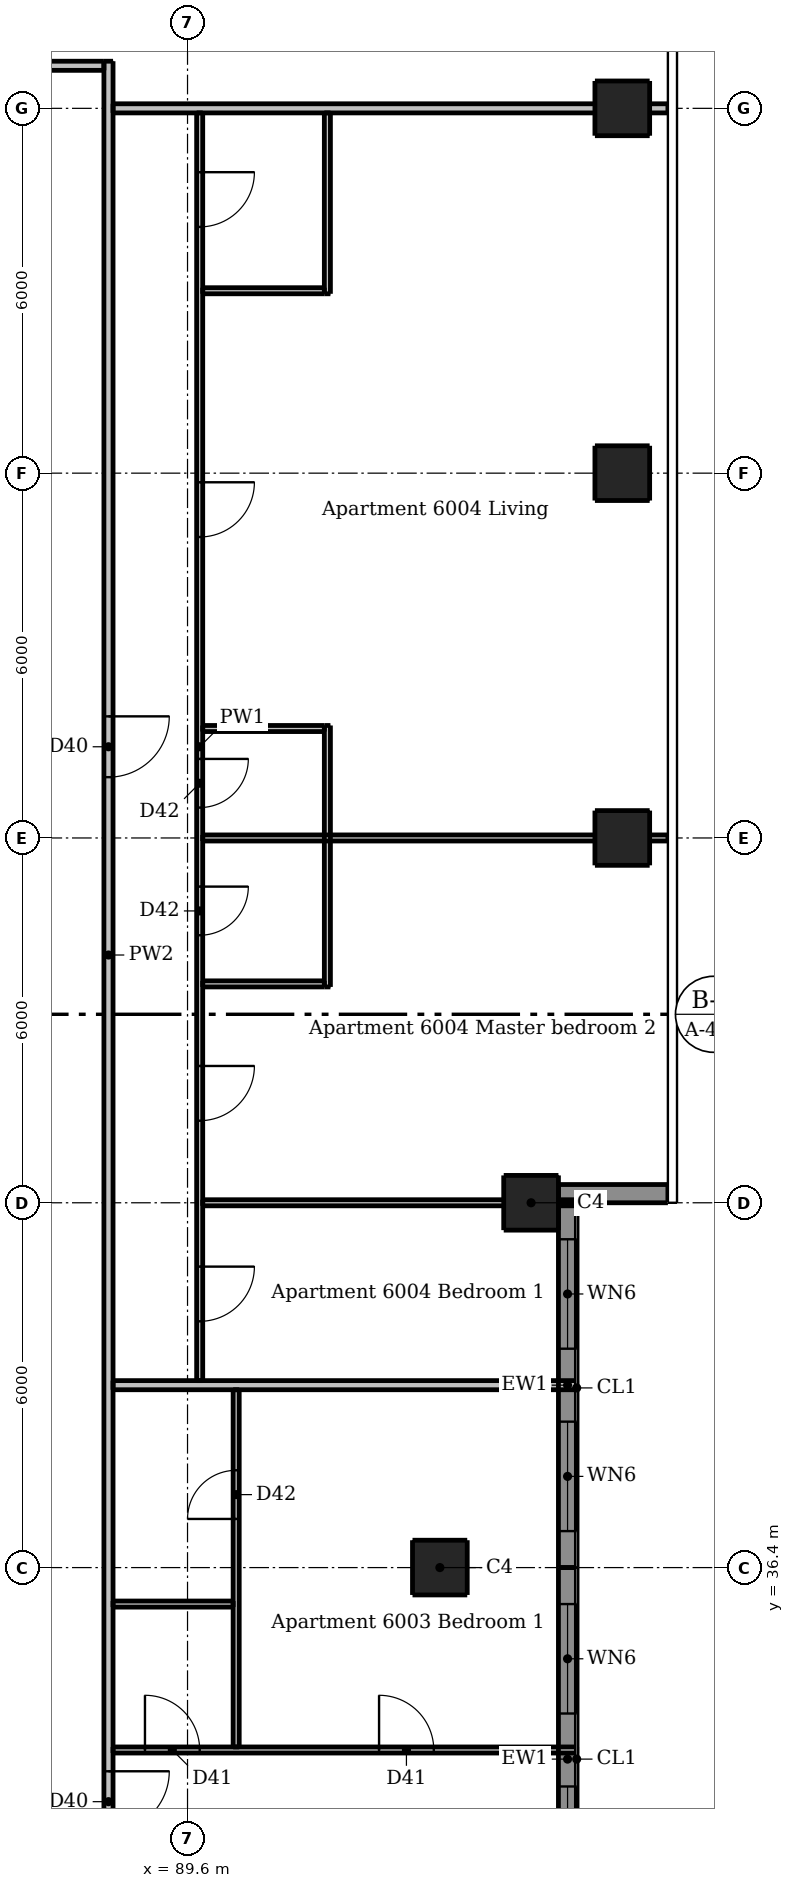
"""IFC4 building model, lengths in metres.
Left out: names, types, materials, properties, quantities, classifications, styles, units other than length and angle.
Written with IfcOpenShell. Run it as: python <this file> out.ifc"""

import sys

from ifc_helpers import new_model, si_unit, direction, frame, frame_2d, origin, origin_2d, place, context, subcontext, project, spatial, rectangle, extrude, element, fill, save


model = new_model("IFC4")
c1 = context("Model", 3, precision=1e-05, world=origin(), true_north=direction((0.0, 1.0)))
c2 = subcontext(c1, "Body", "Model", "MODEL_VIEW")
j1 = project(units=[si_unit("LENGTHUNIT", "METRE"), si_unit("PLANEANGLEUNIT", "RADIAN")], contexts=[c1])
p1 = place(None, origin())
s1 = spatial("IfcSite", under=j1, at=p1, CompositionType="ELEMENT")
p2 = place(p1, origin())
s2 = spatial("IfcBuilding", under=s1, at=p2, CompositionType="ELEMENT")
p3 = place(p2, frame((0.0, 0.0, 223.3)))
s3 = spatial("IfcBuildingStorey", under=s2, at=p3, CompositionType="ELEMENT", Elevation=223.3)
for number, where, z_axis, x_axis in (
    (1, (93.75, 36.4, 0.0), (0.0, 0.0, 1.0), (1.0, 0.0, 0.0)),
    (2, (95.25, 42.4, 0.0), (0.0, 0.0, 1.0), (1.0, 0.0, 0.0)),
    (3, (96.75, 48.4, 0.0), (0.0, 0.0, 1.0), (1.0, 0.0, 0.0)),
    (4, (96.75, 54.4, 0.0), (0.0, 0.0, 1.0), (1.0, 0.0, 0.0)),
    (5, (96.75, 60.4, 0.0), (0.0, 0.0, 1.0), (1.0, 0.0, 0.0)),
):
    element("IfcColumn", number, at=place(p3, frame(where, z_axis=z_axis, x_axis=x_axis)), inside=s3, PredefinedType="COLUMN", context=c2, shape_type="SweptSolid", body=[
        extrude(rectangle(XDim=0.9, YDim=0.9, at=origin_2d()), origin(), (0.0, 0.0, 1.0), 3.05),
    ])
p4 = place(p3, frame((95.7, 42.55, 0.0), z_axis=(0.0, 0.0, 1.0), x_axis=(1.0, 0.0, 0.0)))
e6 = element("IfcWall", 6, at=p4, inside=s3, PredefinedType="SOLIDWALL", context=c2, shape_type="SweptSolid", body=[
    extrude(rectangle(XDim=1.8, YDim=0.3, at=frame_2d((0.9, 0.0))), origin(), (0.0, 0.0, 1.0), 3.05),
])
p5 = place(p3, frame((95.85, 30.1, 0.0), z_axis=(0.0, 0.0, 1.0), x_axis=(0.0, 1.0, 0.0)))
e7 = element("IfcWall", 7, at=p5, inside=s3, PredefinedType="SOLIDWALL", context=c2, shape_type="SweptSolid", body=[
    extrude(rectangle(XDim=6.3, YDim=0.3, at=frame_2d((3.15, 0.0))), origin(), (0.0, 0.0, 1.0), 3.05),
])
p6 = place(p5, frame((0.9, 0.0, 0.15)))
e8 = element("IfcOpeningElement", 8, at=p6, cuts=e7, PredefinedType="OPENING", context=c2, shape_type="SweptSolid", body=[
    extrude(rectangle(XDim=1.8, YDim=2.1, at=frame_2d((0.9, 1.05))), frame((0.0, 0.16, 0.0), z_axis=(0.0, -1.0, 0.0), x_axis=(1.0, 0.0, 0.0)), (0.0, 0.0, 1.0), 0.32),
])
p7 = place(p5, frame((3.9, 0.0, 0.15)))
e9 = element("IfcOpeningElement", 9, at=p7, cuts=e7, PredefinedType="OPENING", context=c2, shape_type="SweptSolid", body=[
    extrude(rectangle(XDim=1.8, YDim=2.1, at=frame_2d((0.9, 1.05))), frame((0.0, 0.16, 0.0), z_axis=(0.0, -1.0, 0.0), x_axis=(1.0, 0.0, 0.0)), (0.0, 0.0, 1.0), 0.32),
])
p8 = place(p3, frame((95.85, 36.4, 0.0), z_axis=(0.0, 0.0, 1.0), x_axis=(0.0, 1.0, 0.0)))
e10 = element("IfcWall", 10, at=p8, inside=s3, PredefinedType="SOLIDWALL", context=c2, shape_type="SweptSolid", body=[
    extrude(rectangle(XDim=6.0, YDim=0.3, at=frame_2d((3.0, 0.0))), origin(), (0.0, 0.0, 1.0), 3.05),
])
p9 = place(p8, frame((0.6, 0.0, 0.15)))
e11 = element("IfcOpeningElement", 11, at=p9, cuts=e10, PredefinedType="OPENING", context=c2, shape_type="SweptSolid", body=[
    extrude(rectangle(XDim=1.8, YDim=2.1, at=frame_2d((0.9, 1.05))), frame((0.0, 0.16, 0.0), z_axis=(0.0, -1.0, 0.0), x_axis=(1.0, 0.0, 0.0)), (0.0, 0.0, 1.0), 0.32),
])
p10 = place(p8, frame((3.6, 0.0, 0.15)))
e12 = element("IfcOpeningElement", 12, at=p10, cuts=e10, PredefinedType="OPENING", context=c2, shape_type="SweptSolid", body=[
    extrude(rectangle(XDim=1.8, YDim=2.1, at=frame_2d((0.9, 1.05))), frame((0.0, 0.16, 0.0), z_axis=(0.0, -1.0, 0.0), x_axis=(1.0, 0.0, 0.0)), (0.0, 0.0, 1.0), 0.32),
])
p11 = place(p3, frame((89.8, 60.325, 0.0), z_axis=(0.0, 0.0, 1.0), x_axis=(0.0, -1.0, 0.0)))
e13 = element("IfcWall", 13, at=p11, inside=s3, PredefinedType="PARTITIONING", context=c2, shape_type="SweptSolid", body=[
    extrude(rectangle(XDim=20.85, YDim=0.1, at=frame_2d((10.425, 0.0))), origin(), (0.0, 0.0, 1.0), 3.05),
])
p12 = place(p11, frame((6.075, 0.0, 0.0)))
e14 = element("IfcOpeningElement", 14, at=p12, cuts=e13, PredefinedType="OPENING", context=c2, shape_type="SweptSolid", body=[
    extrude(rectangle(XDim=0.9, YDim=2.1, at=frame_2d((0.45, 1.05))), frame((0.0, 0.06, 0.0), z_axis=(0.0, -1.0, 0.0), x_axis=(1.0, 0.0, 0.0)), (0.0, 0.0, 1.0), 0.12),
])
p13 = place(p11, frame((0.975, 0.0, 0.0)))
e15 = element("IfcOpeningElement", 15, at=p13, cuts=e13, PredefinedType="OPENING", context=c2, shape_type="SweptSolid", body=[
    extrude(rectangle(XDim=0.9, YDim=2.1, at=frame_2d((0.45, 1.05))), frame((0.0, 0.06, 0.0), z_axis=(0.0, -1.0, 0.0), x_axis=(1.0, 0.0, 0.0)), (0.0, 0.0, 1.0), 0.12),
])
p14 = place(p11, frame((10.625, 0.0, 0.0)))
e16 = element("IfcOpeningElement", 16, at=p14, cuts=e13, PredefinedType="OPENING", context=c2, shape_type="SweptSolid", body=[
    extrude(rectangle(XDim=0.8, YDim=2.1, at=frame_2d((0.4, 1.05))), frame((0.0, 0.06, 0.0), z_axis=(0.0, -1.0, 0.0), x_axis=(1.0, 0.0, 0.0)), (0.0, 0.0, 1.0), 0.12),
])
p15 = place(p11, frame((18.975, 0.0, 0.0)))
e17 = element("IfcOpeningElement", 17, at=p15, cuts=e13, PredefinedType="OPENING", context=c2, shape_type="SweptSolid", body=[
    extrude(rectangle(XDim=0.9, YDim=2.1, at=frame_2d((0.45, 1.05))), frame((0.0, 0.06, 0.0), z_axis=(0.0, -1.0, 0.0), x_axis=(1.0, 0.0, 0.0)), (0.0, 0.0, 1.0), 0.12),
])
p16 = place(p11, frame((15.675, 0.0, 0.0)))
e18 = element("IfcOpeningElement", 18, at=p16, cuts=e13, PredefinedType="OPENING", context=c2, shape_type="SweptSolid", body=[
    extrude(rectangle(XDim=0.9, YDim=2.1, at=frame_2d((0.45, 1.05))), frame((0.0, 0.06, 0.0), z_axis=(0.0, -1.0, 0.0), x_axis=(1.0, 0.0, 0.0)), (0.0, 0.0, 1.0), 0.12),
])
p17 = place(p11, frame((12.725, 0.0, 0.0)))
e19 = element("IfcOpeningElement", 19, at=p17, cuts=e13, PredefinedType="OPENING", context=c2, shape_type="SweptSolid", body=[
    extrude(rectangle(XDim=0.8, YDim=2.1, at=frame_2d((0.4, 1.05))), frame((0.0, 0.06, 0.0), z_axis=(0.0, -1.0, 0.0), x_axis=(1.0, 0.0, 0.0)), (0.0, 0.0, 1.0), 0.12),
])
p18 = place(p3, frame((90.4, 33.45, 0.0), z_axis=(0.0, 0.0, 1.0), x_axis=(0.0, 1.0, 0.0)))
e20 = element("IfcWall", 20, at=p18, inside=s3, PredefinedType="PARTITIONING", context=c2, shape_type="SweptSolid", body=[
    extrude(rectangle(XDim=5.875, YDim=0.1, at=frame_2d((2.938, 0.0))), origin(), (0.0, 0.0, 1.0), 3.05),
])
p19 = place(p18, frame((3.75, 0.0, 0.0)))
e21 = element("IfcOpeningElement", 21, at=p19, cuts=e20, PredefinedType="OPENING", context=c2, shape_type="SweptSolid", body=[
    extrude(rectangle(XDim=0.8, YDim=2.1, at=frame_2d((0.4, 1.05))), frame((0.0, 0.06, 0.0), z_axis=(0.0, -1.0, 0.0), x_axis=(1.0, 0.0, 0.0)), (0.0, 0.0, 1.0), 0.12),
])
p20 = place(p3, frame((91.9, 45.95, 0.0), z_axis=(0.0, 0.0, 1.0), x_axis=(0.0, 1.0, 0.0)))
e22 = element("IfcWall", 22, at=p20, inside=s3, PredefinedType="PARTITIONING", context=c2, shape_type="SweptSolid", body=[
    extrude(rectangle(XDim=4.3, YDim=0.1, at=frame_2d((2.15, 0.0))), origin(), (0.0, 0.0, 1.0), 3.05),
])
p21 = place(p3, frame((91.9, 57.35, 0.0), z_axis=(0.0, 0.0, 1.0), x_axis=(0.0, 1.0, 0.0)))
e23 = element("IfcWall", 23, at=p21, inside=s3, PredefinedType="PARTITIONING", context=c2, shape_type="SweptSolid", body=[
    extrude(rectangle(XDim=2.975, YDim=0.1, at=frame_2d((1.487, 0.0))), origin(), (0.0, 0.0, 1.0), 3.05),
])
for number, where, z_axis, x_axis in (
    (24, (89.85, 57.4, 0.0), (0.0, 0.0, 1.0), (1.0, 0.0, 0.0)),
    (25, (89.85, 50.2, 0.0), (0.0, 0.0, 1.0), (1.0, 0.0, 0.0)),
):
    element("IfcWall", number, at=place(p3, frame(where, z_axis=z_axis, x_axis=x_axis)), inside=s3, PredefinedType="PARTITIONING", context=c2, shape_type="SweptSolid", body=[
        extrude(rectangle(XDim=2.0, YDim=0.1, at=frame_2d((1.0, 0.0))), origin(), (0.0, 0.0, 1.0), 3.05),
    ])
p22 = place(p3, frame((89.85, 48.4, 0.0), z_axis=(0.0, 0.0, 1.0), x_axis=(1.0, 0.0, 0.0)))
e26 = element("IfcWall", 26, at=p22, inside=s3, PredefinedType="PARTITIONING", context=c2, shape_type="SweptSolid", body=[
    extrude(rectangle(XDim=7.65, YDim=0.1, at=frame_2d((3.825, 0.0))), origin(), (0.0, 0.0, 1.0), 2.516),
])
p23 = place(p3, frame((89.85, 46.0, 0.0), z_axis=(0.0, 0.0, 1.0), x_axis=(1.0, 0.0, 0.0)))
e27 = element("IfcWall", 27, at=p23, inside=s3, PredefinedType="PARTITIONING", context=c2, shape_type="SweptSolid", body=[
    extrude(rectangle(XDim=2.0, YDim=0.1, at=frame_2d((1.0, 0.0))), origin(), (0.0, 0.0, 1.0), 3.05),
])
p24 = place(p3, frame((89.85, 42.4, 0.0), z_axis=(0.0, 0.0, 1.0), x_axis=(1.0, 0.0, 0.0)))
e28 = element("IfcWall", 28, at=p24, inside=s3, PredefinedType="PARTITIONING", context=c2, shape_type="SweptSolid", body=[
    extrude(rectangle(XDim=6.15, YDim=0.1, at=frame_2d((3.075, 0.0))), origin(), (0.0, 0.0, 1.0), 2.59),
])
p25 = place(p3, frame((88.375, 35.8, 0.0), z_axis=(0.0, 0.0, 1.0), x_axis=(1.0, 0.0, 0.0)))
e29 = element("IfcWall", 29, at=p25, inside=s3, PredefinedType="PARTITIONING", context=c2, shape_type="SweptSolid", body=[
    extrude(rectangle(XDim=1.975, YDim=0.1, at=frame_2d((0.988, 0.0))), origin(), (0.0, 0.0, 1.0), 3.05),
])
p26 = place(p3, frame((88.375, 33.4, 0.0), z_axis=(0.0, 0.0, 1.0), x_axis=(1.0, 0.0, 0.0)))
e30 = element("IfcWall", 30, at=p26, inside=s3, PredefinedType="PARTITIONING", context=c2, shape_type="SweptSolid", body=[
    extrude(rectangle(XDim=7.625, YDim=0.1, at=frame_2d((3.812, 0.0))), origin(), (0.0, 0.0, 1.0), 3.05),
])
p27 = place(p26, frame((0.525, 0.0, 0.0)))
e31 = element("IfcOpeningElement", 31, at=p27, cuts=e30, PredefinedType="OPENING", context=c2, shape_type="SweptSolid", body=[
    extrude(rectangle(XDim=0.9, YDim=2.1, at=frame_2d((0.45, 1.05))), frame((0.0, 0.06, 0.0), z_axis=(0.0, -1.0, 0.0), x_axis=(1.0, 0.0, 0.0)), (0.0, 0.0, 1.0), 0.12),
])
p28 = place(p26, frame((4.375, 0.0, 0.0)))
e32 = element("IfcOpeningElement", 32, at=p28, cuts=e30, PredefinedType="OPENING", context=c2, shape_type="SweptSolid", body=[
    extrude(rectangle(XDim=0.9, YDim=2.1, at=frame_2d((0.45, 1.05))), frame((0.0, 0.06, 0.0), z_axis=(0.0, -1.0, 0.0), x_axis=(1.0, 0.0, 0.0)), (0.0, 0.0, 1.0), 0.12),
])
p29 = place(p3, frame((88.3, 61.175, 0.0), z_axis=(0.0, 0.0, 1.0), x_axis=(0.0, -1.0, 0.0)))
e33 = element("IfcWall", 33, at=p29, inside=s3, PredefinedType="PARTITIONING", context=c2, shape_type="SweptSolid", body=[
    extrude(rectangle(XDim=29.4, YDim=0.15, at=frame_2d((14.7, 0.0))), origin(), (0.0, 0.0, 1.0), 3.05),
])
p30 = place(p29, frame((28.125, 0.0, 0.0)))
e34 = element("IfcOpeningElement", 34, at=p30, cuts=e33, PredefinedType="OPENING", context=c2, shape_type="SweptSolid", body=[
    extrude(rectangle(XDim=1.0, YDim=2.1, at=frame_2d((0.5, 1.05))), frame((0.0, 0.085, 0.0), z_axis=(0.0, -1.0, 0.0), x_axis=(1.0, 0.0, 0.0)), (0.0, 0.0, 1.0), 0.17),
])
p31 = place(p29, frame((10.775, 0.0, 0.0)))
e35 = element("IfcOpeningElement", 35, at=p31, cuts=e33, PredefinedType="OPENING", context=c2, shape_type="SweptSolid", body=[
    extrude(rectangle(XDim=1.0, YDim=2.1, at=frame_2d((0.5, 1.05))), frame((0.0, 0.085, 0.0), z_axis=(0.0, -1.0, 0.0), x_axis=(1.0, 0.0, 0.0)), (0.0, 0.0, 1.0), 0.17),
])
p32 = place(p3, frame((58.975, 61.1, 0.0), z_axis=(0.0, 0.0, 1.0), x_axis=(1.0, 0.0, 0.0)))
e36 = element("IfcWall", 36, at=p32, inside=s3, PredefinedType="PARTITIONING", context=c2, shape_type="SweptSolid", body=[
    extrude(rectangle(XDim=29.25, YDim=0.15, at=frame_2d((14.625, 0.0))), origin(), (0.0, 0.0, 1.0), 3.05),
])
p33 = place(p32, frame((9.125, 0.0, 0.0)))
e37 = element("IfcOpeningElement", 37, at=p33, cuts=e36, PredefinedType="OPENING", context=c2, shape_type="SweptSolid", body=[
    extrude(rectangle(XDim=1.0, YDim=2.1, at=frame_2d((0.5, 1.05))), frame((0.0, 0.085, 0.0), z_axis=(0.0, -1.0, 0.0), x_axis=(1.0, 0.0, 0.0)), (0.0, 0.0, 1.0), 0.17),
])
p34 = place(p32, frame((26.475, 0.0, 0.0)))
e38 = element("IfcOpeningElement", 38, at=p34, cuts=e36, PredefinedType="OPENING", context=c2, shape_type="SweptSolid", body=[
    extrude(rectangle(XDim=1.0, YDim=2.1, at=frame_2d((0.5, 1.05))), frame((0.0, 0.085, 0.0), z_axis=(0.0, -1.0, 0.0), x_axis=(1.0, 0.0, 0.0)), (0.0, 0.0, 1.0), 0.17),
])
p35 = place(p3, frame((88.375, 60.4, 0.0), z_axis=(0.0, 0.0, 1.0), x_axis=(1.0, 0.0, 0.0)))
e39 = element("IfcWall", 39, at=p35, inside=s3, PredefinedType="PARTITIONING", context=c2, shape_type="SweptSolid", body=[
    extrude(rectangle(XDim=9.125, YDim=0.15, at=frame_2d((4.562, 0.0))), origin(), (0.0, 0.0, 1.0), 2.59),
])
p36 = place(p3, frame((88.375, 39.4, 0.0), z_axis=(0.0, 0.0, 1.0), x_axis=(1.0, 0.0, 0.0)))
e40 = element("IfcWall", 40, at=p36, inside=s3, PredefinedType="PARTITIONING", context=c2, shape_type="SweptSolid", body=[
    extrude(rectangle(XDim=7.625, YDim=0.15, at=frame_2d((3.812, 0.0))), origin(), (0.0, 0.0, 1.0), 3.05),
])
p37 = place(p6, origin())
e41 = element("IfcWindow", 41, at=p37, inside=s3, PartitioningType="DOUBLE_PANEL_VERTICAL", PredefinedType="WINDOW", context=c2, shape_type="SweptSolid", body=[
    extrude(rectangle(XDim=1.8, YDim=2.1, at=frame_2d((0.9, 1.05))), frame((0.0, 0.03, 0.0), z_axis=(0.0, -1.0, 0.0), x_axis=(1.0, 0.0, 0.0)), (0.0, 0.0, 1.0), 0.06),
])
fill(e8, e41)
p38 = place(p7, origin())
e42 = element("IfcWindow", 42, at=p38, inside=s3, PartitioningType="DOUBLE_PANEL_VERTICAL", PredefinedType="WINDOW", context=c2, shape_type="SweptSolid", body=[
    extrude(rectangle(XDim=1.8, YDim=2.1, at=frame_2d((0.9, 1.05))), frame((0.0, 0.03, 0.0), z_axis=(0.0, -1.0, 0.0), x_axis=(1.0, 0.0, 0.0)), (0.0, 0.0, 1.0), 0.06),
])
fill(e9, e42)
p39 = place(p9, origin())
e43 = element("IfcWindow", 43, at=p39, inside=s3, PartitioningType="DOUBLE_PANEL_VERTICAL", PredefinedType="WINDOW", context=c2, shape_type="SweptSolid", body=[
    extrude(rectangle(XDim=1.8, YDim=2.1, at=frame_2d((0.9, 1.05))), frame((0.0, 0.03, 0.0), z_axis=(0.0, -1.0, 0.0), x_axis=(1.0, 0.0, 0.0)), (0.0, 0.0, 1.0), 0.06),
])
fill(e11, e43)
p40 = place(p10, origin())
e44 = element("IfcWindow", 44, at=p40, inside=s3, PartitioningType="DOUBLE_PANEL_VERTICAL", PredefinedType="WINDOW", context=c2, shape_type="SweptSolid", body=[
    extrude(rectangle(XDim=1.8, YDim=2.1, at=frame_2d((0.9, 1.05))), frame((0.0, 0.03, 0.0), z_axis=(0.0, -1.0, 0.0), x_axis=(1.0, 0.0, 0.0)), (0.0, 0.0, 1.0), 0.06),
])
fill(e12, e44)
p41 = place(p30, origin())
e45 = element("IfcDoor", 45, at=p41, inside=s3, OperationType="SINGLE_SWING_LEFT", PredefinedType="DOOR", context=c2, shape_type="SweptSolid", body=[
    extrude(rectangle(XDim=1.0, YDim=2.1, at=frame_2d((0.5, 1.05))), frame((0.0, 0.025, 0.0), z_axis=(0.0, -1.0, 0.0), x_axis=(1.0, 0.0, 0.0)), (0.0, 0.0, 1.0), 0.05),
])
fill(e34, e45)
p42 = place(p27, origin())
e46 = element("IfcDoor", 46, at=p42, inside=s3, OperationType="SINGLE_SWING_LEFT", PredefinedType="DOOR", context=c2, shape_type="SweptSolid", body=[
    extrude(rectangle(XDim=0.9, YDim=2.1, at=frame_2d((0.45, 1.05))), frame((0.0, 0.025, 0.0), z_axis=(0.0, -1.0, 0.0), x_axis=(1.0, 0.0, 0.0)), (0.0, 0.0, 1.0), 0.05),
])
fill(e31, e46)
p43 = place(p28, origin())
e47 = element("IfcDoor", 47, at=p43, inside=s3, OperationType="SINGLE_SWING_LEFT", PredefinedType="DOOR", context=c2, shape_type="SweptSolid", body=[
    extrude(rectangle(XDim=0.9, YDim=2.1, at=frame_2d((0.45, 1.05))), frame((0.0, 0.025, 0.0), z_axis=(0.0, -1.0, 0.0), x_axis=(1.0, 0.0, 0.0)), (0.0, 0.0, 1.0), 0.05),
])
fill(e32, e47)
p44 = place(p19, origin())
e48 = element("IfcDoor", 48, at=p44, inside=s3, OperationType="SINGLE_SWING_LEFT", PredefinedType="DOOR", context=c2, shape_type="SweptSolid", body=[
    extrude(rectangle(XDim=0.8, YDim=2.1, at=frame_2d((0.4, 1.05))), frame((0.0, 0.025, 0.0), z_axis=(0.0, -1.0, 0.0), x_axis=(1.0, 0.0, 0.0)), (0.0, 0.0, 1.0), 0.05),
])
fill(e21, e48)
p45 = place(p31, origin())
e49 = element("IfcDoor", 49, at=p45, inside=s3, OperationType="SINGLE_SWING_LEFT", PredefinedType="DOOR", context=c2, shape_type="SweptSolid", body=[
    extrude(rectangle(XDim=1.0, YDim=2.1, at=frame_2d((0.5, 1.05))), frame((0.0, 0.025, 0.0), z_axis=(0.0, -1.0, 0.0), x_axis=(1.0, 0.0, 0.0)), (0.0, 0.0, 1.0), 0.05),
])
fill(e35, e49)
p46 = place(p12, origin())
e50 = element("IfcDoor", 50, at=p46, inside=s3, OperationType="SINGLE_SWING_LEFT", PredefinedType="DOOR", context=c2, shape_type="SweptSolid", body=[
    extrude(rectangle(XDim=0.9, YDim=2.1, at=frame_2d((0.45, 1.05))), frame((0.0, 0.025, 0.0), z_axis=(0.0, -1.0, 0.0), x_axis=(1.0, 0.0, 0.0)), (0.0, 0.0, 1.0), 0.05),
])
fill(e14, e50)
p47 = place(p13, origin())
e51 = element("IfcDoor", 51, at=p47, inside=s3, OperationType="SINGLE_SWING_LEFT", PredefinedType="DOOR", context=c2, shape_type="SweptSolid", body=[
    extrude(rectangle(XDim=0.9, YDim=2.1, at=frame_2d((0.45, 1.05))), frame((0.0, 0.025, 0.0), z_axis=(0.0, -1.0, 0.0), x_axis=(1.0, 0.0, 0.0)), (0.0, 0.0, 1.0), 0.05),
])
fill(e15, e51)
p48 = place(p14, origin())
e52 = element("IfcDoor", 52, at=p48, inside=s3, OperationType="SINGLE_SWING_LEFT", PredefinedType="DOOR", context=c2, shape_type="SweptSolid", body=[
    extrude(rectangle(XDim=0.8, YDim=2.1, at=frame_2d((0.4, 1.05))), frame((0.0, 0.025, 0.0), z_axis=(0.0, -1.0, 0.0), x_axis=(1.0, 0.0, 0.0)), (0.0, 0.0, 1.0), 0.05),
])
fill(e16, e52)
p49 = place(p15, origin())
e53 = element("IfcDoor", 53, at=p49, inside=s3, OperationType="SINGLE_SWING_LEFT", PredefinedType="DOOR", context=c2, shape_type="SweptSolid", body=[
    extrude(rectangle(XDim=0.9, YDim=2.1, at=frame_2d((0.45, 1.05))), frame((0.0, 0.025, 0.0), z_axis=(0.0, -1.0, 0.0), x_axis=(1.0, 0.0, 0.0)), (0.0, 0.0, 1.0), 0.05),
])
fill(e17, e53)
p50 = place(p16, origin())
e54 = element("IfcDoor", 54, at=p50, inside=s3, OperationType="SINGLE_SWING_LEFT", PredefinedType="DOOR", context=c2, shape_type="SweptSolid", body=[
    extrude(rectangle(XDim=0.9, YDim=2.1, at=frame_2d((0.45, 1.05))), frame((0.0, 0.025, 0.0), z_axis=(0.0, -1.0, 0.0), x_axis=(1.0, 0.0, 0.0)), (0.0, 0.0, 1.0), 0.05),
])
fill(e18, e54)
p51 = place(p17, origin())
e55 = element("IfcDoor", 55, at=p51, inside=s3, OperationType="SINGLE_SWING_LEFT", PredefinedType="DOOR", context=c2, shape_type="SweptSolid", body=[
    extrude(rectangle(XDim=0.8, YDim=2.1, at=frame_2d((0.4, 1.05))), frame((0.0, 0.025, 0.0), z_axis=(0.0, -1.0, 0.0), x_axis=(1.0, 0.0, 0.0)), (0.0, 0.0, 1.0), 0.05),
])
fill(e19, e55)
save(model, sys.argv[1])
